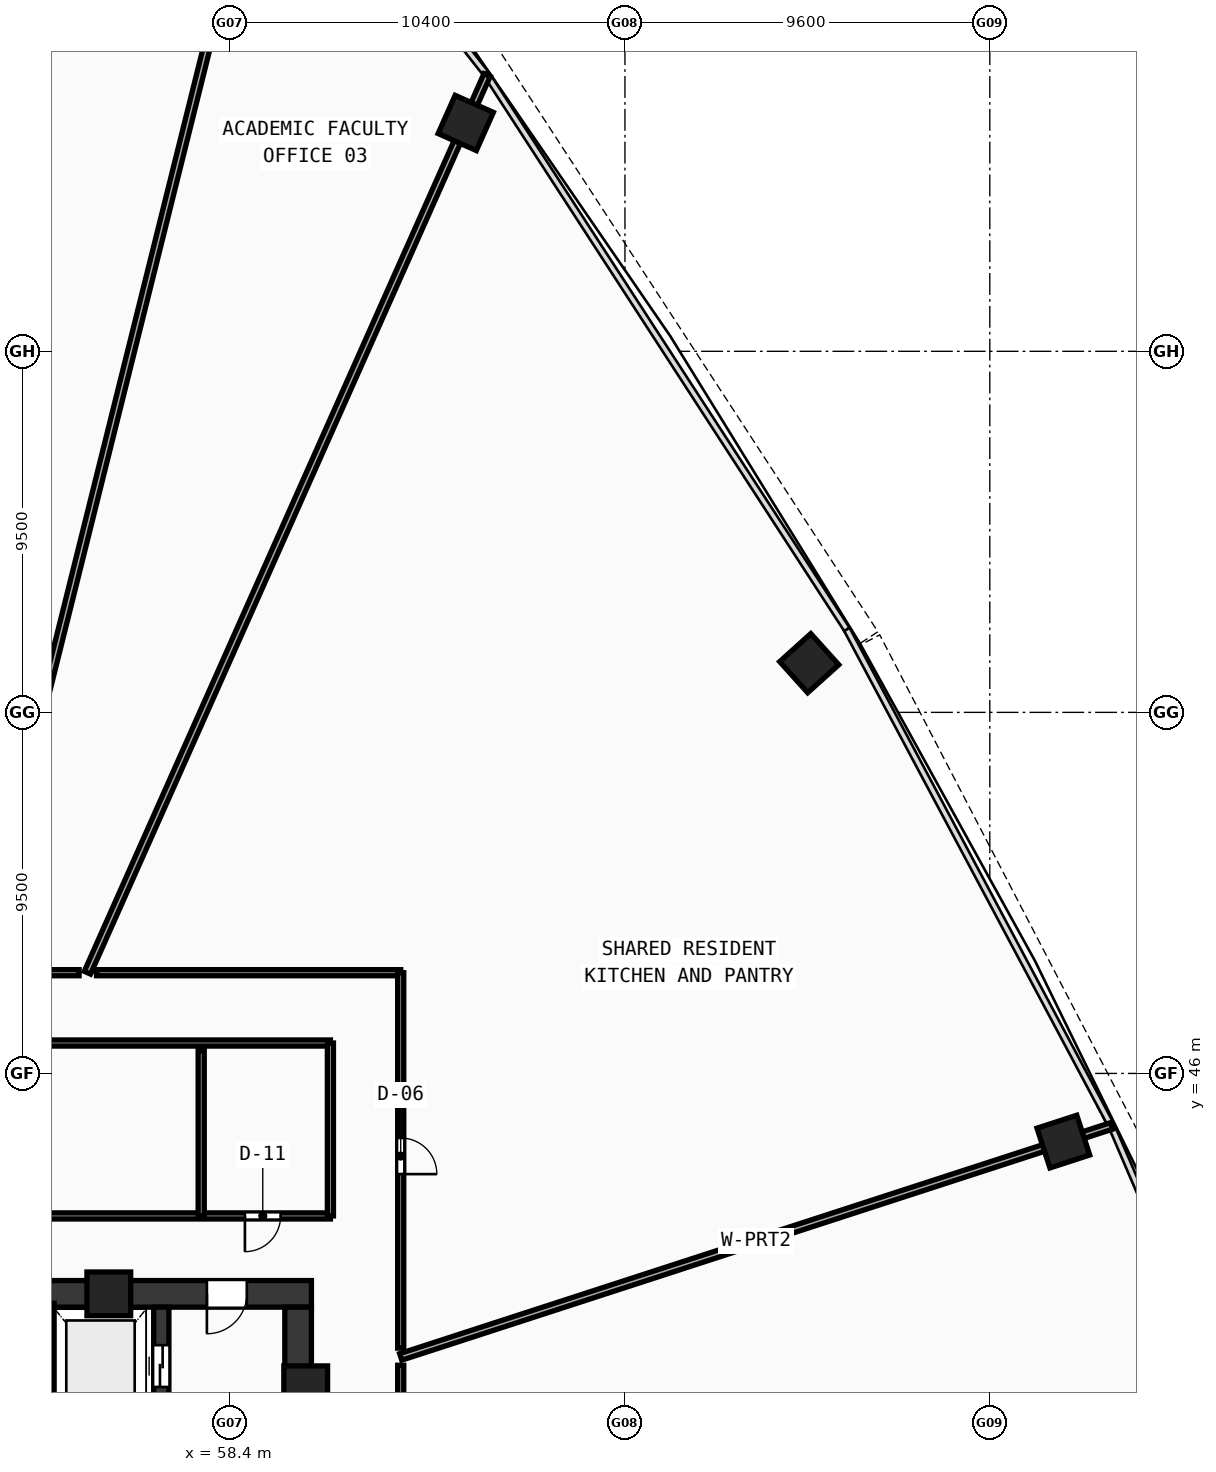
"""IFC4 building model, lengths in metres.
Left out: names, types, materials, properties, quantities, classifications, styles, units other than length and angle.
Written with IfcOpenShell. Run it as: python <this file> out.ifc"""

import sys

from ifc_helpers import new_model, si_unit, direction, frame, frame_2d, origin, origin_with_axes, origin_2d, place, context, subcontext, project, spatial, rectangle, hollow_rectangle, extrude, source, transform, mapped, element, fill, save


model = new_model("IFC4")
c1 = context("Model", 3, precision=1e-05, world=origin(), true_north=direction((0.0, 1.0)))
c2 = subcontext(c1, "Body", "Model", "MODEL_VIEW")
j1 = project(units=[si_unit("LENGTHUNIT", "METRE"), si_unit("PLANEANGLEUNIT", "RADIAN")], contexts=[c1])
p1 = place(None, origin())
s1 = spatial("IfcSite", under=j1, at=p1, CompositionType="ELEMENT")
p2 = place(p1, origin())
s2 = spatial("IfcBuilding", under=s1, at=p2, CompositionType="ELEMENT")
p3 = place(p2, frame((0.0, 0.0, 59.44)))
s3 = spatial("IfcBuildingStorey", under=s2, at=p3, CompositionType="ELEMENT", Elevation=59.44)
p4 = place(p3, frame((49.2, 40.2, 0.0), z_axis=(0.0, 0.0, 1.0), x_axis=(1.0, 0.0, 0.0)))
e1 = element("IfcWall", 1, at=p4, inside=s3, PredefinedType="SHEAR", context=c2, shape_type="SweptSolid", body=[
    extrude(rectangle(XDim=11.35, YDim=0.7, at=frame_2d((5.675, 0.0))), origin(), (0.0, 0.0, 1.0), 3.37),
])
p5 = place(p4, frame((8.6, 0.0, 0.0)))
e2 = element("IfcOpeningElement", 2, at=p5, cuts=e1, PredefinedType="OPENING", context=c2, shape_type="SweptSolid", body=[
    extrude(rectangle(XDim=1.05, YDim=2.1, at=frame_2d((0.525, 1.05))), frame((0.0, 0.36, 0.0), z_axis=(0.0, -1.0, 0.0), x_axis=(1.0, 0.0, 0.0)), (0.0, 0.0, 1.0), 0.72),
])
p6 = place(p3, frame((60.2, 27.85, 0.0), z_axis=(0.0, 0.0, 1.0), x_axis=(0.0, 1.0, 0.0)))
e3 = element("IfcWall", 3, at=p6, inside=s3, PredefinedType="SHEAR", context=c2, shape_type="SweptSolid", body=[
    extrude(rectangle(XDim=12.0, YDim=0.7, at=frame_2d((6.0, 0.0))), origin(), (0.0, 0.0, 1.0), 3.37),
])
p7 = place(p3, frame((56.6, 27.85, 0.0), z_axis=(0.0, 0.0, 1.0), x_axis=(0.0, 1.0, 0.0)))
e4 = element("IfcWall", 4, at=p7, inside=s3, PredefinedType="SHEAR", context=c2, shape_type="SweptSolid", body=[
    extrude(rectangle(XDim=12.0, YDim=0.4, at=frame_2d((6.0, 0.0))), origin(), (0.0, 0.0, 1.0), 3.37),
])
p8 = place(p7, frame((9.9, 0.0, 0.0)))
e5 = element("IfcOpeningElement", 5, at=p8, cuts=e4, PredefinedType="OPENING", context=c2, shape_type="SweptSolid", body=[
    extrude(rectangle(XDim=1.1, YDim=2.1, at=frame_2d((0.55, 1.05))), frame((0.0, 0.21, 0.0), z_axis=(0.0, -1.0, 0.0), x_axis=(1.0, 0.0, 0.0)), (0.0, 0.0, 1.0), 0.42),
])
m1 = source(origin(), c2, "Body", "SweptSolid", [
    extrude(hollow_rectangle(XDim=1.15, YDim=1.15, WallThickness=0.048, at=origin_2d()), origin(), (0.0, 0.0, 1.0), 3.63),
])
for number, where, z_axis, x_axis in (
    (6, (60.4, 37.729, -0.26), (0.0, 0.0, 1.0), (1.0, 0.0, 0.0)),
    (7, (55.219, 40.2, -0.26), (0.0, 0.0, 1.0), (1.0, 0.0, 0.0)),
):
    element("IfcColumn", number, at=place(p3, frame(where, z_axis=z_axis, x_axis=x_axis)), inside=s3, PredefinedType="COLUMN", context=c2, shape_type="MappedRepresentation", body=[
        mapped(m1, transform((0.0, 0.0, 0.0), scale=1.0)),
    ])
m2 = source(origin(), c2, "Body", "SweptSolid", [
    extrude(hollow_rectangle(XDim=1.1, YDim=1.1, WallThickness=0.045, at=origin_2d()), origin(), (0.0, 0.0, 1.0), 3.63),
])
for number, where, z_axis, x_axis in (
    (8, (80.335, 44.206, -0.26), (0.0, 0.0, 1.0), (-0.309, 0.951, 0.0)),
    (9, (73.649, 56.794, -0.26), (0.0, 0.0, 1.0), (-0.669, 0.743, 0.0)),
    (10, (64.611, 71.009, -0.26), (0.0, 0.0, 1.0), (-0.914, 0.407, 0.0)),
):
    element("IfcColumn", number, at=place(p3, frame(where, z_axis=z_axis, x_axis=x_axis)), inside=s3, PredefinedType="COLUMN", context=c2, shape_type="MappedRepresentation", body=[
        mapped(m2, transform((0.0, 0.0, 0.0), scale=1.0)),
    ])
p9 = place(p3, frame((53.68, 36.65, 0.0), z_axis=(0.0, 0.0, 1.0), x_axis=(0.0, 1.0, 0.0)))
e11 = element("IfcWall", 11, at=p9, inside=s3, PredefinedType="SOLIDWALL", context=c2, shape_type="SweptSolid", body=[
    extrude(rectangle(XDim=3.3, YDim=0.2, at=frame_2d((1.65, 0.0))), origin(), (0.0, 0.0, 1.0), 3.37),
])
p10 = place(p3, frame((45.92, 42.25, 0.0), z_axis=(0.0, 0.0, 1.0), x_axis=(1.0, 0.0, 0.0)))
e12 = element("IfcWall", 12, at=p10, inside=s3, PredefinedType="PARTITIONING", context=c2, shape_type="SweptSolid", body=[
    extrude(rectangle(XDim=15.13, YDim=0.16, at=frame_2d((7.565, 0.0))), origin(), (0.0, 0.0, 1.0), 2.67),
])
p11 = place(p10, frame((2.1, 0.0, 0.0)))
e13 = element("IfcOpeningElement", 13, at=p11, cuts=e12, PredefinedType="OPENING", context=c2, shape_type="SweptSolid", body=[
    extrude(rectangle(XDim=0.92, YDim=2.1, at=frame_2d((0.46, 1.05))), frame((0.0, 0.09, 0.0), z_axis=(0.0, -1.0, 0.0), x_axis=(1.0, 0.0, 0.0)), (0.0, 0.0, 1.0), 0.18),
])
p12 = place(p10, frame((12.88, 0.0, 0.0)))
e14 = element("IfcOpeningElement", 14, at=p12, cuts=e12, PredefinedType="OPENING", context=c2, shape_type="SweptSolid", body=[
    extrude(rectangle(XDim=0.94, YDim=2.1, at=frame_2d((0.47, 1.05))), frame((0.0, 0.09, 0.0), z_axis=(0.0, -1.0, 0.0), x_axis=(1.0, 0.0, 0.0)), (0.0, 0.0, 1.0), 0.18),
])
p13 = place(p3, frame((45.92, 46.8, 0.0), z_axis=(0.0, 0.0, 1.0), x_axis=(1.0, 0.0, 0.0)))
e15 = element("IfcWall", 15, at=p13, inside=s3, PredefinedType="PARTITIONING", context=c2, shape_type="SweptSolid", body=[
    extrude(rectangle(XDim=15.13, YDim=0.16, at=frame_2d((7.565, 0.0))), origin(), (0.0, 0.0, 1.0), 2.67),
])
p14 = place(p3, frame((61.05, 42.25, 0.0), z_axis=(0.0, 0.0, 1.0), x_axis=(0.0, 1.0, 0.0)))
e16 = element("IfcWall", 16, at=p14, inside=s3, PredefinedType="PARTITIONING", context=c2, shape_type="SweptSolid", body=[
    extrude(rectangle(XDim=4.55, YDim=0.16, at=frame_2d((2.275, 0.0))), origin(), (0.0, 0.0, 1.0), 2.67),
])
p15 = place(p3, frame((57.65, 42.25, 0.0), z_axis=(0.0, 0.0, 1.0), x_axis=(0.0, 1.0, 0.0)))
e17 = element("IfcWall", 17, at=p15, inside=s3, PredefinedType="PARTITIONING", context=c2, shape_type="SweptSolid", body=[
    extrude(rectangle(XDim=4.35, YDim=0.16, at=frame_2d((2.175, 0.0))), origin(), (0.0, 0.0, 1.0), 2.67),
])
p16 = place(p3, frame((62.9, 38.541, 0.0), z_axis=(0.0, 0.0, 1.0), x_axis=(0.951053317048, 0.309026840471, 0.0)))
e18 = element("IfcWall", 18, at=p16, inside=s3, PredefinedType="PARTITIONING", context=c2, shape_type="SweptSolid", body=[
    extrude(rectangle(XDim=19.666, YDim=0.18, at=frame_2d((9.833, 0.0))), origin(), (0.0, 0.0, 1.0), 2.67),
])
p17 = place(p3, frame((54.656, 48.65, 0.0), z_axis=(0.0, 0.0, 1.0), x_axis=(0.406729800422, 0.913548504158, 0.0)))
e19 = element("IfcWall", 19, at=p17, inside=s3, PredefinedType="PARTITIONING", context=c2, shape_type="SweptSolid", body=[
    extrude(rectangle(XDim=25.854, YDim=0.18, at=frame_2d((12.927, 0.0))), origin(), (0.0, 0.0, 1.0), 2.67),
])
p18 = place(p3, frame((51.728, 48.65, 0.0), z_axis=(0.0, 0.0, 1.0), x_axis=(0.241918895985, 0.970296474159, 0.0)))
e20 = element("IfcWall", 20, at=p18, inside=s3, PredefinedType="PARTITIONING", context=c2, shape_type="SweptSolid", body=[
    extrude(rectangle(XDim=31.858, YDim=0.18, at=frame_2d((15.929, 0.0))), origin(), (0.0, 0.0, 1.0), 2.67),
])
p19 = place(p3, frame((51.954, 48.65, 0.0), z_axis=(0.0, 0.0, 1.0), x_axis=(1.0, 0.0, 0.0)))
e21 = element("IfcWall", 21, at=p19, inside=s3, PredefinedType="PARTITIONING", context=c2, shape_type="SweptSolid", body=[
    extrude(rectangle(XDim=2.482, YDim=0.16, at=frame_2d((1.241, 0.0))), origin(), (0.0, 0.0, 1.0), 2.67),
])
p20 = place(p19, frame((0.778, 0.0, 0.0)))
e22 = element("IfcOpeningElement", 22, at=p20, cuts=e21, PredefinedType="OPENING", context=c2, shape_type="SweptSolid", body=[
    extrude(rectangle(XDim=0.92, YDim=2.1, at=frame_2d((0.46, 1.05))), frame((0.0, 0.09, 0.0), z_axis=(0.0, -1.0, 0.0), x_axis=(1.0, 0.0, 0.0)), (0.0, 0.0, 1.0), 0.18),
])
p21 = place(p3, frame((54.897, 48.65, 0.0), z_axis=(0.0, 0.0, 1.0), x_axis=(1.0, 0.0, 0.0)))
e23 = element("IfcWall", 23, at=p21, inside=s3, PredefinedType="PARTITIONING", context=c2, shape_type="SweptSolid", body=[
    extrude(rectangle(XDim=8.003, YDim=0.16, at=frame_2d((4.001, 0.0))), origin(), (0.0, 0.0, 1.0), 2.97),
])
p22 = place(p3, frame((62.9, 48.65, 0.0), z_axis=(0.0, 0.0, 1.0), x_axis=(0.0, -1.0, 0.0)))
e24 = element("IfcWall", 24, at=p22, inside=s3, PredefinedType="PARTITIONING", context=c2, shape_type="SweptSolid", body=[
    extrude(rectangle(XDim=9.877, YDim=0.16, at=frame_2d((4.938, 0.0))), origin(), (0.0, 0.0, 1.0), 2.67),
])
p23 = place(p22, frame((4.349, 0.0, 0.0)))
e25 = element("IfcOpeningElement", 25, at=p23, cuts=e24, PredefinedType="OPENING", context=c2, shape_type="SweptSolid", body=[
    extrude(rectangle(XDim=0.95, YDim=2.1, at=frame_2d((0.475, 1.05))), frame((0.0, 0.09, 0.0), z_axis=(0.0, -1.0, 0.0), x_axis=(1.0, 0.0, 0.0)), (0.0, 0.0, 1.0), 0.18),
])
p24 = place(p3, frame((62.9, 38.322, 0.0), z_axis=(0.0, 0.0, 1.0), x_axis=(0.0, -1.0, 0.0)))
e26 = element("IfcWall", 26, at=p24, inside=s3, PredefinedType="PARTITIONING", context=c2, shape_type="SweptSolid", body=[
    extrude(rectangle(XDim=7.029, YDim=0.16, at=frame_2d((3.515, 0.0))), origin(), (0.0, 0.0, 1.0), 3.37),
])
p25 = place(p24, frame((3.054, 0.0, 0.0)))
e27 = element("IfcOpeningElement", 27, at=p25, cuts=e26, PredefinedType="OPENING", context=c2, shape_type="SweptSolid", body=[
    extrude(rectangle(XDim=0.92, YDim=2.1, at=frame_2d((0.46, 1.05))), frame((0.0, 0.09, 0.0), z_axis=(0.0, -1.0, 0.0), x_axis=(1.0, 0.0, 0.0)), (0.0, 0.0, 1.0), 0.18),
])
m3 = source(origin(), c2, "Body", "SweptSolid", [
    extrude(rectangle(XDim=1.05, YDim=2.1, at=frame_2d((0.525, 1.05))), frame((0.0, 0.025, 0.0), z_axis=(0.0, -1.0, 0.0), x_axis=(1.0, 0.0, 0.0)), (0.0, 0.0, 1.0), 0.05),
])
p26 = place(p5, frame((1.05, 0.0, 0.0), z_axis=(0.0, 0.0, 1.0), x_axis=(-1.0, 0.0, 0.0)))
e28 = element("IfcDoor", 28, at=p26, inside=s3, OperationType="SINGLE_SWING_RIGHT", PredefinedType="DOOR", context=c2, shape_type="MappedRepresentation", body=[
    mapped(m3, transform((0.0, 0.0, 0.0), scale=1.0)),
])
fill(e2, e28)
m4 = source(origin(), c2, "Body", "SweptSolid", [
    extrude(rectangle(XDim=1.1, YDim=2.1, at=frame_2d((0.55, 1.05))), frame((0.0, 0.025, 0.0), z_axis=(0.0, -1.0, 0.0), x_axis=(1.0, 0.0, 0.0)), (0.0, 0.0, 1.0), 0.05),
])
p27 = place(p8, origin_with_axes())
e29 = element("IfcDoor", 29, at=p27, inside=s3, OperationType="DOUBLE_DOOR_SLIDING", PredefinedType="DOOR", context=c2, shape_type="MappedRepresentation", body=[
    mapped(m4, transform((0.0, 0.0, 0.0), scale=1.0)),
])
fill(e5, e29)
m5 = source(origin(), c2, "Body", "SweptSolid", [
    extrude(rectangle(XDim=0.94, YDim=2.1, at=frame_2d((0.47, 1.05))), frame((0.0, 0.025, 0.0), z_axis=(0.0, -1.0, 0.0), x_axis=(1.0, 0.0, 0.0)), (0.0, 0.0, 1.0), 0.05),
])
p28 = place(p12, frame((0.94, 0.0, 0.0), z_axis=(0.0, 0.0, 1.0), x_axis=(-1.0, 0.0, 0.0)))
e30 = element("IfcDoor", 30, at=p28, inside=s3, OperationType="SINGLE_SWING_RIGHT", PredefinedType="DOOR", context=c2, shape_type="MappedRepresentation", body=[
    mapped(m5, transform((0.0, 0.0, 0.0), scale=1.0)),
])
fill(e14, e30)
m6 = source(origin(), c2, "Body", "SweptSolid", [
    extrude(rectangle(XDim=0.95, YDim=2.1, at=frame_2d((0.475, 1.05))), frame((0.0, 0.025, 0.0), z_axis=(0.0, -1.0, 0.0), x_axis=(1.0, 0.0, 0.0)), (0.0, 0.0, 1.0), 0.05),
])
p29 = place(p23, origin_with_axes())
e31 = element("IfcDoor", 31, at=p29, inside=s3, OperationType="SINGLE_SWING_RIGHT", PredefinedType="DOOR", context=c2, shape_type="MappedRepresentation", body=[
    mapped(m6, transform((0.0, 0.0, 0.0), scale=1.0)),
])
fill(e25, e31)
save(model, sys.argv[1])
